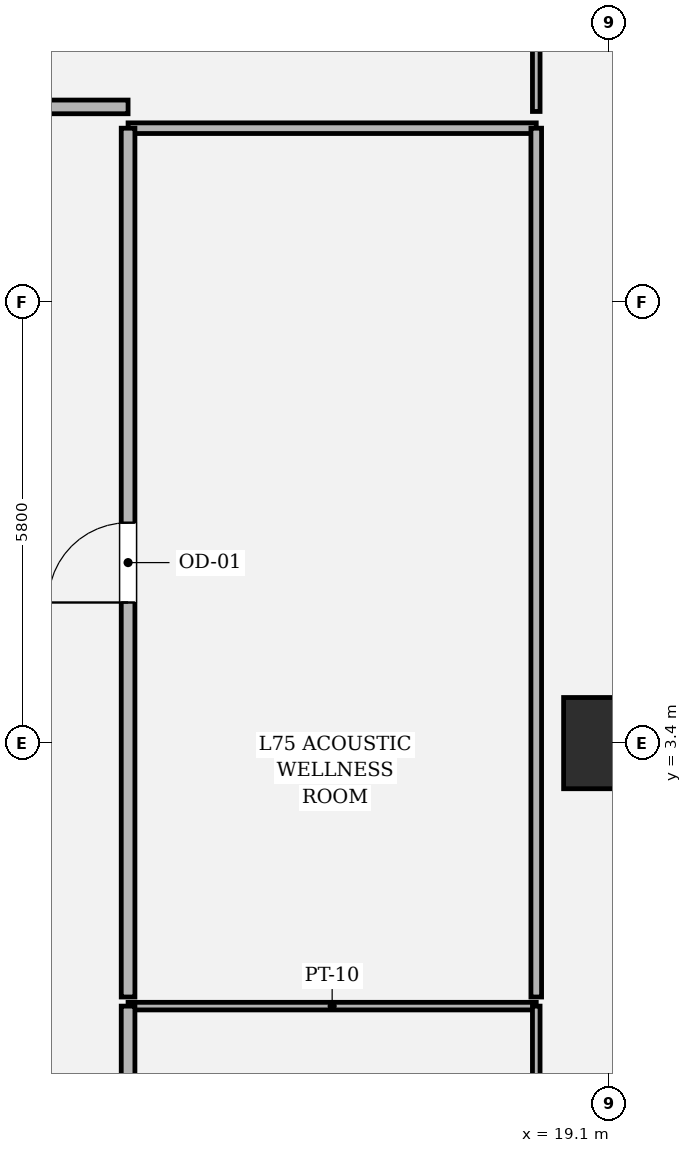
"""IFC4 building model, lengths in metres.
Left out: names, types, materials, properties, quantities, classifications, styles, units other than length and angle.
Written with IfcOpenShell. Run it as: python <this file> out.ifc"""

import sys

from ifc_helpers import new_model, si_unit, direction, frame, frame_2d, origin, origin_2d, place, context, subcontext, project, spatial, rectangle, hollow_rectangle, extrude, element, fill, save


model = new_model("IFC4")
c1 = context("Model", 3, precision=1e-05, world=origin(), true_north=direction((0.0, 1.0)))
c2 = subcontext(c1, "Body", "Model", "MODEL_VIEW")
j1 = project(units=[si_unit("LENGTHUNIT", "METRE"), si_unit("PLANEANGLEUNIT", "RADIAN")], contexts=[c1])
p1 = place(None, origin())
s1 = spatial("IfcSite", under=j1, at=p1, CompositionType="ELEMENT")
p2 = place(p1, origin())
s2 = spatial("IfcBuilding", under=s1, at=p2, CompositionType="ELEMENT")
p3 = place(p2, frame((0.0, 0.0, 317.4)))
s3 = spatial("IfcBuildingStorey", under=s2, at=p3, CompositionType="ELEMENT", Elevation=317.4)
p4 = place(p3, frame((19.1, 3.4, 0.0), z_axis=(0.0, 0.0, 1.0), x_axis=(1.0, 0.0, 0.0)))
e1 = element("IfcColumn", 1, at=p4, inside=s3, PredefinedType="COLUMN", context=c2, shape_type="SweptSolid", body=[
    extrude(hollow_rectangle(XDim=1.2, YDim=1.2, WallThickness=0.035, at=origin_2d()), origin(), (0.0, 0.0, 1.0), 4.2),
])
p5 = place(p3, frame((12.77, -0.06, 0.0), z_axis=(0.0, 0.0, 1.0), x_axis=(1.0, 0.0, 0.0)))
e2 = element("IfcWall", 2, at=p5, inside=s3, PredefinedType="PARTITIONING", context=c2, shape_type="SweptSolid", body=[
    extrude(rectangle(XDim=5.37, YDim=0.1, at=frame_2d((2.685, 0.0))), origin(), (0.0, 0.0, 1.0), 4.0),
])
p6 = place(p3, frame((18.14, -0.06, 0.0), z_axis=(0.0, 0.0, 1.0), x_axis=(0.0, -1.0, 0.0)))
e3 = element("IfcWall", 3, at=p6, inside=s3, PredefinedType="PARTITIONING", context=c2, shape_type="SweptSolid", body=[
    extrude(rectangle(XDim=11.43, YDim=0.1, at=frame_2d((5.715, 0.0))), origin(), (0.0, 0.0, 1.0), 3.394),
])
p7 = place(p3, frame((12.77, -11.49, 0.0), z_axis=(0.0, 0.0, 1.0), x_axis=(0.0, 1.0, 0.0)))
e4 = element("IfcWall", 4, at=p7, inside=s3, PredefinedType="PARTITIONING", context=c2, shape_type="SweptSolid", body=[
    extrude(rectangle(XDim=11.43, YDim=0.18, at=frame_2d((5.715, 0.0))), origin(), (0.0, 0.0, 1.0), 3.394),
])
p8 = place(p7, frame((5.205, 0.0, 0.0)))
e5 = element("IfcOpeningElement", 5, at=p8, cuts=e4, PredefinedType="OPENING", context=c2, shape_type="SweptSolid", body=[
    extrude(rectangle(XDim=1.02, YDim=2.2, at=frame_2d((0.51, 1.1))), frame((0.0, 0.1, 0.0), z_axis=(0.0, -1.0, 0.0), x_axis=(1.0, 0.0, 0.0)), (0.0, 0.0, 1.0), 0.2),
])
p9 = place(p3, frame((12.77, 11.49, 0.0), z_axis=(0.0, 0.0, 1.0), x_axis=(1.0, 0.0, 0.0)))
e6 = element("IfcWall", 6, at=p9, inside=s3, PredefinedType="PARTITIONING", context=c2, shape_type="SweptSolid", body=[
    extrude(rectangle(XDim=5.37, YDim=0.14, at=frame_2d((2.685, 0.0))), origin(), (0.0, 0.0, 1.0), 3.634),
])
p10 = place(p3, frame((18.14, 11.49, 0.0), z_axis=(0.0, 0.0, 1.0), x_axis=(0.0, -1.0, 0.0)))
e7 = element("IfcWall", 7, at=p10, inside=s3, PredefinedType="PARTITIONING", context=c2, shape_type="SweptSolid", body=[
    extrude(rectangle(XDim=11.43, YDim=0.14, at=frame_2d((5.715, 0.0))), origin(), (0.0, 0.0, 1.0), 3.394),
])
p11 = place(p3, frame((12.77, 0.06, 0.0), z_axis=(0.0, 0.0, 1.0), x_axis=(0.0, 1.0, 0.0)))
e8 = element("IfcWall", 8, at=p11, inside=s3, PredefinedType="PARTITIONING", context=c2, shape_type="SweptSolid", body=[
    extrude(rectangle(XDim=11.43, YDim=0.18, at=frame_2d((5.715, 0.0))), origin(), (0.0, 0.0, 1.0), 3.394),
])
p12 = place(p11, frame((5.19, 0.0, 0.0)))
e9 = element("IfcOpeningElement", 9, at=p12, cuts=e8, PredefinedType="OPENING", context=c2, shape_type="SweptSolid", body=[
    extrude(rectangle(XDim=1.05, YDim=2.2, at=frame_2d((0.525, 1.1))), frame((0.0, 0.1, 0.0), z_axis=(0.0, -1.0, 0.0), x_axis=(1.0, 0.0, 0.0)), (0.0, 0.0, 1.0), 0.2),
])
p13 = place(p3, frame((12.77, 11.77, 0.0), z_axis=(0.0, 0.0, 1.0), x_axis=(-1.0, 0.0, 0.0)))
e10 = element("IfcWall", 10, at=p13, inside=s3, PredefinedType="PARTITIONING", context=c2, shape_type="SweptSolid", body=[
    extrude(rectangle(XDim=6.776, YDim=0.18, at=frame_2d((3.388, 0.0))), origin(), (0.0, 0.0, 1.0), 3.394),
])
p14 = place(p13, frame((2.878, 0.0, 0.0)))
e11 = element("IfcOpeningElement", 11, at=p14, cuts=e10, PredefinedType="OPENING", context=c2, shape_type="SweptSolid", body=[
    extrude(rectangle(XDim=1.02, YDim=2.2, at=frame_2d((0.51, 1.1))), frame((0.0, 0.1, 0.0), z_axis=(0.0, -1.0, 0.0), x_axis=(1.0, 0.0, 0.0)), (0.0, 0.0, 1.0), 0.2),
])
p15 = place(p3, frame((18.14, 16.54, 0.0), z_axis=(0.0, 0.0, 1.0), x_axis=(0.0, -1.0, 0.0)))
e12 = element("IfcWall", 12, at=p15, inside=s3, PredefinedType="PARTITIONING", context=c2, shape_type="SweptSolid", body=[
    extrude(rectangle(XDim=4.83, YDim=0.1, at=frame_2d((2.415, 0.0))), origin(), (0.0, 0.0, 1.0), 3.634),
])
p16 = place(p12, origin())
e13 = element("IfcDoor", 13, at=p16, inside=s3, OperationType="SINGLE_SWING_LEFT", PredefinedType="DOOR", context=c2, shape_type="SweptSolid", body=[
    extrude(rectangle(XDim=1.05, YDim=2.2, at=frame_2d((0.525, 1.1))), frame((0.0, 0.025, 0.0), z_axis=(0.0, -1.0, 0.0), x_axis=(1.0, 0.0, 0.0)), (0.0, 0.0, 1.0), 0.05),
])
fill(e9, e13)
save(model, sys.argv[1])
